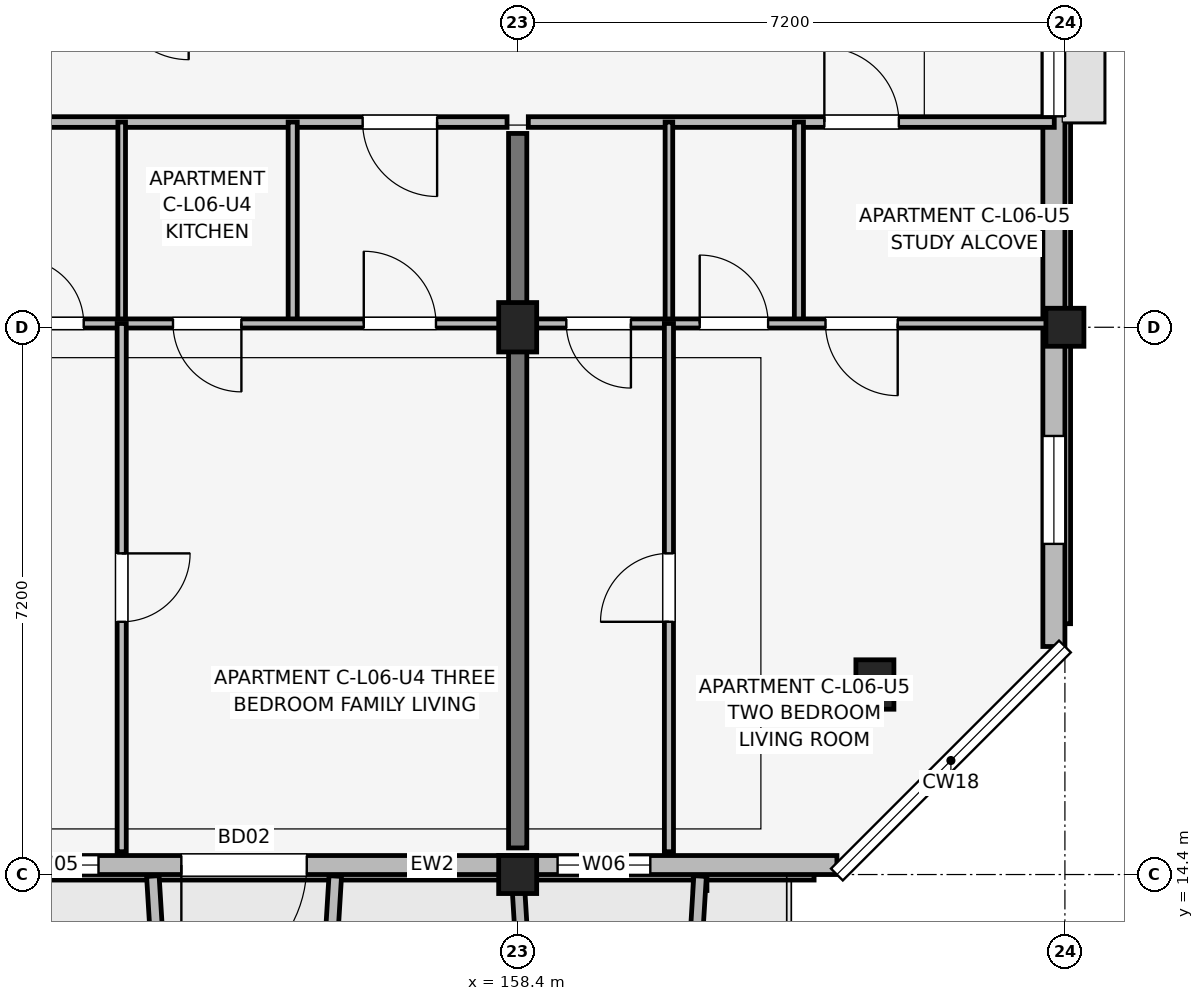
"""IFC4 building model, lengths in metres.
Left out: names, types, materials, properties, quantities, classifications, styles, units other than length and angle.
Written with IfcOpenShell. Run it as: python <this file> out.ifc"""

import sys

from ifc_helpers import new_model, si_unit, direction, frame, frame_2d, origin, origin_2d, place, context, subcontext, project, spatial, rectangle, extrude, element, fill, save


model = new_model("IFC4")
c1 = context("Model", 3, precision=1e-05, world=origin(), true_north=direction((0.0, 1.0)))
c2 = subcontext(c1, "Body", "Model", "MODEL_VIEW")
j1 = project(units=[si_unit("LENGTHUNIT", "METRE"), si_unit("PLANEANGLEUNIT", "RADIAN")], contexts=[c1])
p1 = place(None, origin())
s1 = spatial("IfcSite", under=j1, at=p1, CompositionType="ELEMENT")
p2 = place(p1, origin())
s2 = spatial("IfcBuilding", under=s1, at=p2, CompositionType="ELEMENT")
p3 = place(p2, frame((0.0, 0.0, 21.3)))
s3 = spatial("IfcBuildingStorey", under=s2, at=p3, CompositionType="ELEMENT", Elevation=21.3)
p4 = place(p3, frame((158.4, 14.4, 0.0), z_axis=(0.0, 0.0, 1.0), x_axis=(1.0, 0.0, 0.0)))
e1 = element("IfcColumn", 1, at=p4, inside=s3, PredefinedType="COLUMN", context=c2, shape_type="SweptSolid", body=[
    extrude(rectangle(XDim=0.5, YDim=0.5, at=origin_2d()), origin(), (0.0, 0.0, 1.0), 3.15),
])
for number, where, z_axis, x_axis in (
    (2, (158.4, 21.6, 0.0), (0.0, 0.0, 1.0), (1.0, 0.0, 0.0)),
    (3, (163.1, 16.9, 0.0), (0.0, 0.0, 1.0), (1.0, 0.0, 0.0)),
):
    element("IfcColumn", number, at=place(p3, frame(where, z_axis=z_axis, x_axis=x_axis)), inside=s3, PredefinedType="COLUMN", context=c2, shape_type="SweptSolid", body=[
        extrude(rectangle(XDim=0.5, YDim=0.65, at=origin_2d()), origin(), (0.0, 0.0, 1.0), 3.15),
    ])
p5 = place(p3, frame((165.6, 21.6, 0.0), z_axis=(0.0, 0.0, 1.0), x_axis=(1.0, 0.0, 0.0)))
e4 = element("IfcColumn", 4, at=p5, inside=s3, PredefinedType="COLUMN", context=c2, shape_type="SweptSolid", body=[
    extrude(rectangle(XDim=0.5, YDim=0.5, at=origin_2d()), origin(), (0.0, 0.0, 1.0), 3.15),
])
p6 = place(p3, frame((158.4, 14.75, 0.0), z_axis=(0.0, 0.0, 1.0), x_axis=(0.0, 1.0, 0.0)))
e5 = element("IfcWall", 5, at=p6, inside=s3, PredefinedType="SHEAR", context=c2, shape_type="SweptSolid", body=[
    extrude(rectangle(XDim=9.4, YDim=0.24, at=frame_2d((4.7, 0.0))), origin(), (0.0, 0.0, 1.0), 3.15),
])
p7 = place(p3, frame((132.6, 14.525, 0.0), z_axis=(0.0, 0.0, 1.0), x_axis=(1.0, 0.0, 0.0)))
e6 = element("IfcWall", 6, at=p7, inside=s3, PredefinedType="SOLIDWALL", context=c2, shape_type="SweptSolid", body=[
    extrude(rectangle(XDim=30.0, YDim=0.25, at=frame_2d((15.0, 0.0))), origin(), (0.0, 0.0, 1.0), 2.43),
])
p8 = place(p7, frame((8.7, 0.0, 0.0), z_axis=(0.0, 0.0, 1.0), x_axis=(-1.0, 0.0, 0.0)))
e7 = element("IfcOpeningElement", 7, at=p8, cuts=e6, PredefinedType="OPENING", context=c2, shape_type="SweptSolid", body=[
    extrude(rectangle(XDim=1.8, YDim=2.15, at=frame_2d((0.9, 1.075))), frame((0.0, 0.135, 0.0), z_axis=(0.0, -1.0, 0.0), x_axis=(1.0, 0.0, 0.0)), (0.0, 0.0, 1.0), 0.27),
])
p9 = place(p7, frame((23.025, 0.0, 0.0), z_axis=(0.0, 0.0, 1.0), x_axis=(-1.0, 0.0, 0.0)))
e8 = element("IfcOpeningElement", 8, at=p9, cuts=e6, PredefinedType="OPENING", context=c2, shape_type="SweptSolid", body=[
    extrude(rectangle(XDim=1.65, YDim=2.15, at=frame_2d((0.825, 1.075))), frame((0.0, 0.135, 0.0), z_axis=(0.0, -1.0, 0.0), x_axis=(1.0, 0.0, 0.0)), (0.0, 0.0, 1.0), 0.27),
])
p10 = place(p7, frame((1.995, 0.0, 0.7)))
e9 = element("IfcOpeningElement", 9, at=p10, cuts=e6, PredefinedType="OPENING", context=c2, shape_type="SweptSolid", body=[
    extrude(rectangle(XDim=1.72, YDim=1.6, at=frame_2d((0.86, 0.8))), frame((0.0, 0.135, 0.0), z_axis=(0.0, -1.0, 0.0), x_axis=(1.0, 0.0, 0.0)), (0.0, 0.0, 1.0), 0.27),
])
p11 = place(p7, frame((4.975, 0.0, 0.75)))
e10 = element("IfcOpeningElement", 10, at=p11, cuts=e6, PredefinedType="OPENING", context=c2, shape_type="SweptSolid", body=[
    extrude(rectangle(XDim=0.72, YDim=1.35, at=frame_2d((0.36, 0.675))), frame((0.0, 0.135, 0.0), z_axis=(0.0, -1.0, 0.0), x_axis=(1.0, 0.0, 0.0)), (0.0, 0.0, 1.0), 0.27),
])
p12 = place(p7, frame((11.815, 0.0, 0.7)))
e11 = element("IfcOpeningElement", 11, at=p12, cuts=e6, PredefinedType="OPENING", context=c2, shape_type="SweptSolid", body=[
    extrude(rectangle(XDim=1.86, YDim=1.6, at=frame_2d((0.93, 0.8))), frame((0.0, 0.135, 0.0), z_axis=(0.0, -1.0, 0.0), x_axis=(1.0, 0.0, 0.0)), (0.0, 0.0, 1.0), 0.27),
])
p13 = place(p7, frame((16.765, 0.0, 0.75)))
e12 = element("IfcOpeningElement", 12, at=p13, cuts=e6, PredefinedType="OPENING", context=c2, shape_type="SweptSolid", body=[
    extrude(rectangle(XDim=0.98, YDim=1.45, at=frame_2d((0.49, 0.725))), frame((0.0, 0.135, 0.0), z_axis=(0.0, -1.0, 0.0), x_axis=(1.0, 0.0, 0.0)), (0.0, 0.0, 1.0), 0.27),
])
p14 = place(p7, frame((19.185, 0.0, 0.75)))
e13 = element("IfcOpeningElement", 13, at=p14, cuts=e6, PredefinedType="OPENING", context=c2, shape_type="SweptSolid", body=[
    extrude(rectangle(XDim=1.1, YDim=1.5, at=frame_2d((0.55, 0.75))), frame((0.0, 0.135, 0.0), z_axis=(0.0, -1.0, 0.0), x_axis=(1.0, 0.0, 0.0)), (0.0, 0.0, 1.0), 0.27),
])
p15 = place(p7, frame((26.325, 0.0, 0.75)))
e14 = element("IfcOpeningElement", 14, at=p15, cuts=e6, PredefinedType="OPENING", context=c2, shape_type="SweptSolid", body=[
    extrude(rectangle(XDim=1.22, YDim=1.5, at=frame_2d((0.61, 0.75))), frame((0.0, 0.135, 0.0), z_axis=(0.0, -1.0, 0.0), x_axis=(1.0, 0.0, 0.0)), (0.0, 0.0, 1.0), 0.27),
])
p16 = place(p3, frame((165.455, 17.4, 0.0), z_axis=(0.0, 0.0, 1.0), x_axis=(0.0, 1.0, 0.0)))
e15 = element("IfcWall", 15, at=p16, inside=s3, PredefinedType="SOLIDWALL", context=c2, shape_type="SweptSolid", body=[
    extrude(rectangle(XDim=15.6, YDim=0.29, at=frame_2d((7.8, 0.0))), origin(), (0.0, 0.0, 1.0), 2.43),
])
p17 = place(p16, frame((6.975, 0.0, 1.05)))
e16 = element("IfcOpeningElement", 16, at=p17, cuts=e15, PredefinedType="OPENING", context=c2, shape_type="SweptSolid", body=[
    extrude(rectangle(XDim=1.65, YDim=1.15, at=frame_2d((0.825, 0.575))), frame((0.0, 0.155, 0.0), z_axis=(0.0, -1.0, 0.0), x_axis=(1.0, 0.0, 0.0)), (0.0, 0.0, 1.0), 0.31),
])
p18 = place(p16, frame((1.35, 0.0, 0.72)))
e17 = element("IfcOpeningElement", 17, at=p18, cuts=e15, PredefinedType="OPENING", context=c2, shape_type="SweptSolid", body=[
    extrude(rectangle(XDim=1.42, YDim=1.6, at=frame_2d((0.71, 0.8))), frame((0.0, 0.155, 0.0), z_axis=(0.0, -1.0, 0.0), x_axis=(1.0, 0.0, 0.0)), (0.0, 0.0, 1.0), 0.31),
])
for number, where, z_axis, x_axis in (
    (18, (153.6, 14.38, 0.0), (0.0, 0.0, 1.0), (0.061, -0.998, 0.0)),
    (19, (156.0, 14.38, 0.0), (0.0, 0.0, 1.0), (-0.061, -0.998, 0.0)),
):
    element("IfcWall", number, at=place(p3, frame(where, z_axis=z_axis, x_axis=x_axis)), inside=s3, PredefinedType="ELEMENTEDWALL", context=c2, shape_type="SweptSolid", body=[
        extrude(rectangle(XDim=1.964, YDim=0.165, at=frame_2d((0.982, 0.0))), origin(), (0.0, 0.0, 1.0), 2.48),
    ])
for number, where, z_axis, x_axis in (
    (20, (158.4, 14.38, 0.0), (0.0, 0.0, 1.0), (0.061, -0.998, 0.0)),
    (21, (160.8, 14.38, 0.0), (0.0, 0.0, 1.0), (-0.061, -0.998, 0.0)),
):
    element("IfcWall", number, at=place(p3, frame(where, z_axis=z_axis, x_axis=x_axis)), inside=s3, PredefinedType="ELEMENTEDWALL", context=c2, shape_type="SweptSolid", body=[
        extrude(rectangle(XDim=1.964, YDim=0.165, at=frame_2d((0.982, 0.0))), origin(), (0.0, 0.0, 1.0), 2.95),
    ])
p19 = place(p3, frame((151.34, 24.3, 0.0), z_axis=(0.0, 0.0, 1.0), x_axis=(1.0, 0.0, 0.0)))
e22 = element("IfcWall", 22, at=p19, inside=s3, PredefinedType="PARTITIONING", context=c2, shape_type="SweptSolid", body=[
    extrude(rectangle(XDim=6.92, YDim=0.14, at=frame_2d((3.46, 0.0))), origin(), (0.0, 0.0, 1.0), 2.38),
])
p20 = place(p19, frame((6.0, 0.0, 0.0), z_axis=(0.0, 0.0, 1.0), x_axis=(-1.0, 0.0, 0.0)))
e23 = element("IfcOpeningElement", 23, at=p20, cuts=e22, PredefinedType="OPENING", context=c2, shape_type="SweptSolid", body=[
    extrude(rectangle(XDim=0.98, YDim=2.1, at=frame_2d((0.49, 1.05))), frame((0.0, 0.08, 0.0), z_axis=(0.0, -1.0, 0.0), x_axis=(1.0, 0.0, 0.0)), (0.0, 0.0, 1.0), 0.16),
])
p21 = place(p3, frame((153.19, 21.65, 0.0), z_axis=(0.0, 0.0, 1.0), x_axis=(0.0, 1.0, 0.0)))
e24 = element("IfcWall", 24, at=p21, inside=s3, PredefinedType="PARTITIONING", context=c2, shape_type="SweptSolid", body=[
    extrude(rectangle(XDim=2.65, YDim=0.1, at=frame_2d((1.325, 0.0))), origin(), (0.0, 0.0, 1.0), 2.38),
])
p22 = place(p3, frame((155.44, 21.65, 0.0), z_axis=(0.0, 0.0, 1.0), x_axis=(0.0, 1.0, 0.0)))
e25 = element("IfcWall", 25, at=p22, inside=s3, PredefinedType="PARTITIONING", context=c2, shape_type="SweptSolid", body=[
    extrude(rectangle(XDim=2.65, YDim=0.12, at=frame_2d((1.325, 0.0))), origin(), (0.0, 0.0, 1.0), 2.38),
])
p23 = place(p3, frame((151.34, 21.65, 0.0), z_axis=(0.0, 0.0, 1.0), x_axis=(1.0, 0.0, 0.0)))
e26 = element("IfcWall", 26, at=p23, inside=s3, PredefinedType="PARTITIONING", context=c2, shape_type="SweptSolid", body=[
    extrude(rectangle(XDim=6.92, YDim=0.12, at=frame_2d((3.46, 0.0))), origin(), (0.0, 0.0, 1.0), 2.38),
])
p24 = place(p23, frame((0.5, 0.0, 0.0)))
e27 = element("IfcOpeningElement", 27, at=p24, cuts=e26, PredefinedType="OPENING", context=c2, shape_type="SweptSolid", body=[
    extrude(rectangle(XDim=0.85, YDim=2.08, at=frame_2d((0.425, 1.04))), frame((0.0, 0.07, 0.0), z_axis=(0.0, -1.0, 0.0), x_axis=(1.0, 0.0, 0.0)), (0.0, 0.0, 1.0), 0.14),
])
p25 = place(p23, frame((3.425, 0.0, 0.0), z_axis=(0.0, 0.0, 1.0), x_axis=(-1.0, 0.0, 0.0)))
e28 = element("IfcOpeningElement", 28, at=p25, cuts=e26, PredefinedType="OPENING", context=c2, shape_type="SweptSolid", body=[
    extrude(rectangle(XDim=0.9, YDim=2.08, at=frame_2d((0.45, 1.04))), frame((0.0, 0.07, 0.0), z_axis=(0.0, -1.0, 0.0), x_axis=(1.0, 0.0, 0.0)), (0.0, 0.0, 1.0), 0.14),
])
p26 = place(p23, frame((5.035, 0.0, 0.0)))
e29 = element("IfcOpeningElement", 29, at=p26, cuts=e26, PredefinedType="OPENING", context=c2, shape_type="SweptSolid", body=[
    extrude(rectangle(XDim=0.95, YDim=2.08, at=frame_2d((0.475, 1.04))), frame((0.0, 0.07, 0.0), z_axis=(0.0, -1.0, 0.0), x_axis=(1.0, 0.0, 0.0)), (0.0, 0.0, 1.0), 0.14),
])
p27 = place(p3, frame((153.19, 14.7, 0.0), z_axis=(0.0, 0.0, 1.0), x_axis=(0.0, 1.0, 0.0)))
e30 = element("IfcWall", 30, at=p27, inside=s3, PredefinedType="PARTITIONING", context=c2, shape_type="SweptSolid", body=[
    extrude(rectangle(XDim=6.95, YDim=0.12, at=frame_2d((3.475, 0.0))), origin(), (0.0, 0.0, 1.0), 2.38),
])
p28 = place(p27, frame((3.925, 0.0, 0.0), z_axis=(0.0, 0.0, 1.0), x_axis=(-1.0, 0.0, 0.0)))
e31 = element("IfcOpeningElement", 31, at=p28, cuts=e30, PredefinedType="OPENING", context=c2, shape_type="SweptSolid", body=[
    extrude(rectangle(XDim=0.9, YDim=2.08, at=frame_2d((0.45, 1.04))), frame((0.0, 0.07, 0.0), z_axis=(0.0, -1.0, 0.0), x_axis=(1.0, 0.0, 0.0)), (0.0, 0.0, 1.0), 0.14),
])
p29 = place(p3, frame((158.54, 24.3, 0.0), z_axis=(0.0, 0.0, 1.0), x_axis=(1.0, 0.0, 0.0)))
e32 = element("IfcWall", 32, at=p29, inside=s3, PredefinedType="PARTITIONING", context=c2, shape_type="SweptSolid", body=[
    extrude(rectangle(XDim=6.92, YDim=0.14, at=frame_2d((3.46, 0.0))), origin(), (0.0, 0.0, 1.0), 2.38),
])
p30 = place(p29, frame((3.895, 0.0, 0.0)))
e33 = element("IfcOpeningElement", 33, at=p30, cuts=e32, PredefinedType="OPENING", context=c2, shape_type="SweptSolid", body=[
    extrude(rectangle(XDim=0.98, YDim=2.1, at=frame_2d((0.49, 1.05))), frame((0.0, 0.08, 0.0), z_axis=(0.0, -1.0, 0.0), x_axis=(1.0, 0.0, 0.0)), (0.0, 0.0, 1.0), 0.16),
])
p31 = place(p3, frame((160.39, 21.65, 0.0), z_axis=(0.0, 0.0, 1.0), x_axis=(0.0, 1.0, 0.0)))
e34 = element("IfcWall", 34, at=p31, inside=s3, PredefinedType="PARTITIONING", context=c2, shape_type="SweptSolid", body=[
    extrude(rectangle(XDim=2.65, YDim=0.1, at=frame_2d((1.325, 0.0))), origin(), (0.0, 0.0, 1.0), 2.38),
])
p32 = place(p3, frame((162.1, 21.65, 0.0), z_axis=(0.0, 0.0, 1.0), x_axis=(0.0, 1.0, 0.0)))
e35 = element("IfcWall", 35, at=p32, inside=s3, PredefinedType="PARTITIONING", context=c2, shape_type="SweptSolid", body=[
    extrude(rectangle(XDim=2.65, YDim=0.12, at=frame_2d((1.325, 0.0))), origin(), (0.0, 0.0, 1.0), 2.38),
])
p33 = place(p3, frame((158.54, 21.65, 0.0), z_axis=(0.0, 0.0, 1.0), x_axis=(1.0, 0.0, 0.0)))
e36 = element("IfcWall", 36, at=p33, inside=s3, PredefinedType="PARTITIONING", context=c2, shape_type="SweptSolid", body=[
    extrude(rectangle(XDim=6.92, YDim=0.12, at=frame_2d((3.46, 0.0))), origin(), (0.0, 0.0, 1.0), 2.38),
])
p34 = place(p33, frame((1.35, 0.0, 0.0), z_axis=(0.0, 0.0, 1.0), x_axis=(-1.0, 0.0, 0.0)))
e37 = element("IfcOpeningElement", 37, at=p34, cuts=e36, PredefinedType="OPENING", context=c2, shape_type="SweptSolid", body=[
    extrude(rectangle(XDim=0.85, YDim=2.08, at=frame_2d((0.425, 1.04))), frame((0.0, 0.07, 0.0), z_axis=(0.0, -1.0, 0.0), x_axis=(1.0, 0.0, 0.0)), (0.0, 0.0, 1.0), 0.14),
])
p35 = place(p33, frame((2.255, 0.0, 0.0)))
e38 = element("IfcOpeningElement", 38, at=p35, cuts=e36, PredefinedType="OPENING", context=c2, shape_type="SweptSolid", body=[
    extrude(rectangle(XDim=0.9, YDim=2.08, at=frame_2d((0.45, 1.04))), frame((0.0, 0.07, 0.0), z_axis=(0.0, -1.0, 0.0), x_axis=(1.0, 0.0, 0.0)), (0.0, 0.0, 1.0), 0.14),
])
p36 = place(p33, frame((4.86, 0.0, 0.0), z_axis=(0.0, 0.0, 1.0), x_axis=(-1.0, 0.0, 0.0)))
e39 = element("IfcOpeningElement", 39, at=p36, cuts=e36, PredefinedType="OPENING", context=c2, shape_type="SweptSolid", body=[
    extrude(rectangle(XDim=0.95, YDim=2.08, at=frame_2d((0.475, 1.04))), frame((0.0, 0.07, 0.0), z_axis=(0.0, -1.0, 0.0), x_axis=(1.0, 0.0, 0.0)), (0.0, 0.0, 1.0), 0.14),
])
p37 = place(p3, frame((160.39, 14.7, 0.0), z_axis=(0.0, 0.0, 1.0), x_axis=(0.0, 1.0, 0.0)))
e40 = element("IfcWall", 40, at=p37, inside=s3, PredefinedType="PARTITIONING", context=c2, shape_type="SweptSolid", body=[
    extrude(rectangle(XDim=6.95, YDim=0.12, at=frame_2d((3.475, 0.0))), origin(), (0.0, 0.0, 1.0), 2.38),
])
p38 = place(p37, frame((3.025, 0.0, 0.0)))
e41 = element("IfcOpeningElement", 41, at=p38, cuts=e40, PredefinedType="OPENING", context=c2, shape_type="SweptSolid", body=[
    extrude(rectangle(XDim=0.9, YDim=2.08, at=frame_2d((0.45, 1.04))), frame((0.0, 0.07, 0.0), z_axis=(0.0, -1.0, 0.0), x_axis=(1.0, 0.0, 0.0)), (0.0, 0.0, 1.0), 0.14),
])
p39 = place(p9, origin())
e42 = element("IfcDoor", 42, at=p39, inside=s3, OperationType="SINGLE_SWING_LEFT", PredefinedType="DOOR", context=c2, shape_type="SweptSolid", body=[
    extrude(rectangle(XDim=1.65, YDim=2.15, at=frame_2d((0.825, 1.075))), frame((0.0, 0.025, 0.0), z_axis=(0.0, -1.0, 0.0), x_axis=(1.0, 0.0, 0.0)), (0.0, 0.0, 1.0), 0.05),
])
fill(e8, e42)
p40 = place(p14, origin())
e43 = element("IfcWindow", 43, at=p40, inside=s3, PartitioningType="SINGLE_PANEL", PredefinedType="WINDOW", context=c2, shape_type="SweptSolid", body=[
    extrude(rectangle(XDim=1.1, YDim=1.5, at=frame_2d((0.55, 0.75))), frame((0.0, 0.03, 0.0), z_axis=(0.0, -1.0, 0.0), x_axis=(1.0, 0.0, 0.0)), (0.0, 0.0, 1.0), 0.06),
])
fill(e13, e43)
p41 = place(p15, origin())
e44 = element("IfcWindow", 44, at=p41, inside=s3, PartitioningType="SINGLE_PANEL", PredefinedType="WINDOW", context=c2, shape_type="SweptSolid", body=[
    extrude(rectangle(XDim=1.22, YDim=1.5, at=frame_2d((0.61, 0.75))), frame((0.0, 0.03, 0.0), z_axis=(0.0, -1.0, 0.0), x_axis=(1.0, 0.0, 0.0)), (0.0, 0.0, 1.0), 0.06),
])
fill(e14, e44)
p42 = place(p17, origin())
e45 = element("IfcWindow", 45, at=p42, inside=s3, PartitioningType="SINGLE_PANEL", PredefinedType="WINDOW", context=c2, shape_type="SweptSolid", body=[
    extrude(rectangle(XDim=1.65, YDim=1.15, at=frame_2d((0.825, 0.575))), frame((0.0, 0.03, 0.0), z_axis=(0.0, -1.0, 0.0), x_axis=(1.0, 0.0, 0.0)), (0.0, 0.0, 1.0), 0.06),
])
fill(e16, e45)
p43 = place(p18, origin())
e46 = element("IfcWindow", 46, at=p43, inside=s3, PartitioningType="SINGLE_PANEL", PredefinedType="WINDOW", context=c2, shape_type="SweptSolid", body=[
    extrude(rectangle(XDim=1.42, YDim=1.6, at=frame_2d((0.71, 0.8))), frame((0.0, 0.03, 0.0), z_axis=(0.0, -1.0, 0.0), x_axis=(1.0, 0.0, 0.0)), (0.0, 0.0, 1.0), 0.06),
])
fill(e17, e46)
p44 = place(p20, origin())
e47 = element("IfcDoor", 47, at=p44, inside=s3, OperationType="SINGLE_SWING_RIGHT", PredefinedType="DOOR", context=c2, shape_type="SweptSolid", body=[
    extrude(rectangle(XDim=0.98, YDim=2.1, at=frame_2d((0.49, 1.05))), frame((0.0, 0.025, 0.0), z_axis=(0.0, -1.0, 0.0), x_axis=(1.0, 0.0, 0.0)), (0.0, 0.0, 1.0), 0.05),
])
fill(e23, e47)
p45 = place(p24, origin())
e48 = element("IfcDoor", 48, at=p45, inside=s3, OperationType="SINGLE_SWING_LEFT", PredefinedType="DOOR", context=c2, shape_type="SweptSolid", body=[
    extrude(rectangle(XDim=0.85, YDim=2.08, at=frame_2d((0.425, 1.04))), frame((0.0, 0.025, 0.0), z_axis=(0.0, -1.0, 0.0), x_axis=(1.0, 0.0, 0.0)), (0.0, 0.0, 1.0), 0.05),
])
fill(e27, e48)
p46 = place(p25, origin())
e49 = element("IfcDoor", 49, at=p46, inside=s3, OperationType="SINGLE_SWING_RIGHT", PredefinedType="DOOR", context=c2, shape_type="SweptSolid", body=[
    extrude(rectangle(XDim=0.9, YDim=2.08, at=frame_2d((0.45, 1.04))), frame((0.0, 0.025, 0.0), z_axis=(0.0, -1.0, 0.0), x_axis=(1.0, 0.0, 0.0)), (0.0, 0.0, 1.0), 0.05),
])
fill(e28, e49)
p47 = place(p26, origin())
e50 = element("IfcDoor", 50, at=p47, inside=s3, OperationType="SINGLE_SWING_LEFT", PredefinedType="DOOR", context=c2, shape_type="SweptSolid", body=[
    extrude(rectangle(XDim=0.95, YDim=2.08, at=frame_2d((0.475, 1.04))), frame((0.0, 0.025, 0.0), z_axis=(0.0, -1.0, 0.0), x_axis=(1.0, 0.0, 0.0)), (0.0, 0.0, 1.0), 0.05),
])
fill(e29, e50)
p48 = place(p28, origin())
e51 = element("IfcDoor", 51, at=p48, inside=s3, OperationType="SINGLE_SWING_RIGHT", PredefinedType="DOOR", context=c2, shape_type="SweptSolid", body=[
    extrude(rectangle(XDim=0.9, YDim=2.08, at=frame_2d((0.45, 1.04))), frame((0.0, 0.025, 0.0), z_axis=(0.0, -1.0, 0.0), x_axis=(1.0, 0.0, 0.0)), (0.0, 0.0, 1.0), 0.05),
])
fill(e31, e51)
p49 = place(p30, origin())
e52 = element("IfcDoor", 52, at=p49, inside=s3, OperationType="SINGLE_SWING_LEFT", PredefinedType="DOOR", context=c2, shape_type="SweptSolid", body=[
    extrude(rectangle(XDim=0.98, YDim=2.1, at=frame_2d((0.49, 1.05))), frame((0.0, 0.025, 0.0), z_axis=(0.0, -1.0, 0.0), x_axis=(1.0, 0.0, 0.0)), (0.0, 0.0, 1.0), 0.05),
])
fill(e33, e52)
p50 = place(p34, origin())
e53 = element("IfcDoor", 53, at=p50, inside=s3, OperationType="SINGLE_SWING_RIGHT", PredefinedType="DOOR", context=c2, shape_type="SweptSolid", body=[
    extrude(rectangle(XDim=0.85, YDim=2.08, at=frame_2d((0.425, 1.04))), frame((0.0, 0.025, 0.0), z_axis=(0.0, -1.0, 0.0), x_axis=(1.0, 0.0, 0.0)), (0.0, 0.0, 1.0), 0.05),
])
fill(e37, e53)
p51 = place(p35, origin())
e54 = element("IfcDoor", 54, at=p51, inside=s3, OperationType="SINGLE_SWING_LEFT", PredefinedType="DOOR", context=c2, shape_type="SweptSolid", body=[
    extrude(rectangle(XDim=0.9, YDim=2.08, at=frame_2d((0.45, 1.04))), frame((0.0, 0.025, 0.0), z_axis=(0.0, -1.0, 0.0), x_axis=(1.0, 0.0, 0.0)), (0.0, 0.0, 1.0), 0.05),
])
fill(e38, e54)
p52 = place(p36, origin())
e55 = element("IfcDoor", 55, at=p52, inside=s3, OperationType="SINGLE_SWING_RIGHT", PredefinedType="DOOR", context=c2, shape_type="SweptSolid", body=[
    extrude(rectangle(XDim=0.95, YDim=2.08, at=frame_2d((0.475, 1.04))), frame((0.0, 0.025, 0.0), z_axis=(0.0, -1.0, 0.0), x_axis=(1.0, 0.0, 0.0)), (0.0, 0.0, 1.0), 0.05),
])
fill(e39, e55)
p53 = place(p38, origin())
e56 = element("IfcDoor", 56, at=p53, inside=s3, OperationType="SINGLE_SWING_LEFT", PredefinedType="DOOR", context=c2, shape_type="SweptSolid", body=[
    extrude(rectangle(XDim=0.9, YDim=2.08, at=frame_2d((0.45, 1.04))), frame((0.0, 0.025, 0.0), z_axis=(0.0, -1.0, 0.0), x_axis=(1.0, 0.0, 0.0)), (0.0, 0.0, 1.0), 0.05),
])
fill(e41, e56)
save(model, sys.argv[1])
